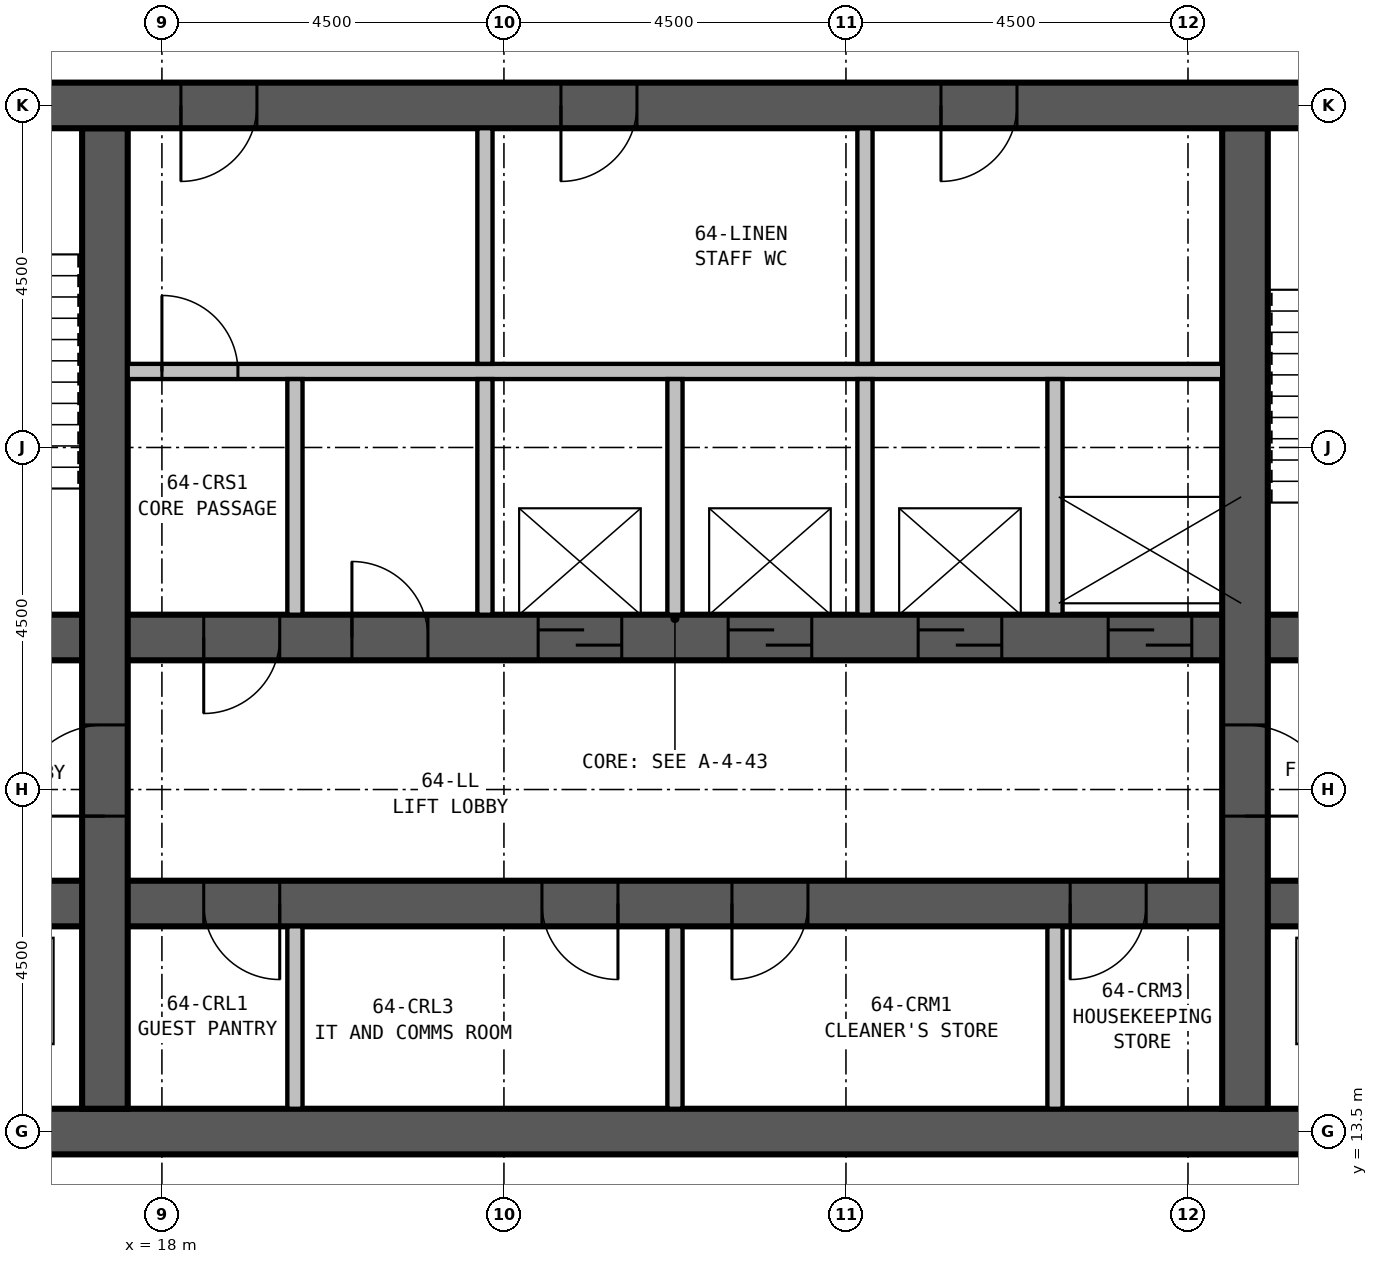
"""IFC4 building model, lengths in metres.
Left out: names, types, materials, properties, quantities, classifications, styles, units other than length and angle.
Written with IfcOpenShell. Run it as: python <this file> out.ifc"""

import sys

from ifc_helpers import new_model, si_unit, direction, frame, frame_2d, origin, place, context, subcontext, project, spatial, rectangle, extrude, element, fill, save


model = new_model("IFC4")
c1 = context("Model", 3, precision=1e-05, world=origin(), true_north=direction((0.0, 1.0)))
c2 = subcontext(c1, "Body", "Model", "MODEL_VIEW")
j1 = project(units=[si_unit("LENGTHUNIT", "METRE"), si_unit("PLANEANGLEUNIT", "RADIAN")], contexts=[c1])
p1 = place(None, origin())
s1 = spatial("IfcSite", under=j1, at=p1, CompositionType="ELEMENT")
p2 = place(p1, origin())
s2 = spatial("IfcBuilding", under=s1, at=p2, CompositionType="ELEMENT")
p3 = place(p2, frame((0.0, 0.0, 250.7)))
s3 = spatial("IfcBuildingStorey", under=s2, at=p3, CompositionType="ELEMENT", Elevation=250.7)
p4 = place(p3, frame((13.2, 13.5, 0.0), z_axis=(0.0, 0.0, 1.0), x_axis=(1.0, 0.0, 0.0)))
e1 = element("IfcWall", 1, at=p4, inside=s3, PredefinedType="SHEAR", context=c2, shape_type="SweptSolid", body=[
    extrude(rectangle(XDim=23.1, YDim=0.6, at=frame_2d((11.55, 0.0))), origin(), (0.0, 0.0, 1.0), 3.9),
])
p5 = place(p3, frame((36.3, 27.0, 0.0), z_axis=(0.0, 0.0, 1.0), x_axis=(-1.0, 0.0, 0.0)))
e2 = element("IfcWall", 2, at=p5, inside=s3, PredefinedType="SHEAR", context=c2, shape_type="SweptSolid", body=[
    extrude(rectangle(XDim=23.6, YDim=0.6, at=frame_2d((11.8, 0.0))), origin(), (0.0, 0.0, 1.0), 3.9),
])
p6 = place(p5, frame((17.05, 0.0, 0.0)))
e3 = element("IfcOpeningElement", 3, at=p6, cuts=e2, PredefinedType="OPENING", context=c2, shape_type="SweptSolid", body=[
    extrude(rectangle(XDim=1.0, YDim=2.1, at=frame_2d((0.5, 1.05))), frame((0.0, 0.31, 0.0), z_axis=(0.0, -1.0, 0.0), x_axis=(1.0, 0.0, 0.0)), (0.0, 0.0, 1.0), 0.62),
])
p7 = place(p5, frame((12.05, 0.0, 0.0)))
e4 = element("IfcOpeningElement", 4, at=p7, cuts=e2, PredefinedType="OPENING", context=c2, shape_type="SweptSolid", body=[
    extrude(rectangle(XDim=1.0, YDim=2.1, at=frame_2d((0.5, 1.05))), frame((0.0, 0.31, 0.0), z_axis=(0.0, -1.0, 0.0), x_axis=(1.0, 0.0, 0.0)), (0.0, 0.0, 1.0), 0.62),
])
p8 = place(p5, frame((7.05, 0.0, 0.0)))
e5 = element("IfcOpeningElement", 5, at=p8, cuts=e2, PredefinedType="OPENING", context=c2, shape_type="SweptSolid", body=[
    extrude(rectangle(XDim=1.0, YDim=2.1, at=frame_2d((0.5, 1.05))), frame((0.0, 0.31, 0.0), z_axis=(0.0, -1.0, 0.0), x_axis=(1.0, 0.0, 0.0)), (0.0, 0.0, 1.0), 0.62),
])
p9 = place(p3, frame((17.25, 13.8, 0.0), z_axis=(0.0, 0.0, 1.0), x_axis=(0.0, 1.0, 0.0)))
e6 = element("IfcWall", 6, at=p9, inside=s3, PredefinedType="SHEAR", context=c2, shape_type="SweptSolid", body=[
    extrude(rectangle(XDim=12.9, YDim=0.6, at=frame_2d((6.45, 0.0))), origin(), (0.0, 0.0, 1.0), 3.9),
])
p10 = place(p9, frame((3.85, 0.0, 0.0)))
e7 = element("IfcOpeningElement", 7, at=p10, cuts=e6, PredefinedType="OPENING", context=c2, shape_type="SweptSolid", body=[
    extrude(rectangle(XDim=1.2, YDim=2.1, at=frame_2d((0.6, 1.05))), frame((0.0, 0.31, 0.0), z_axis=(0.0, -1.0, 0.0), x_axis=(1.0, 0.0, 0.0)), (0.0, 0.0, 1.0), 0.62),
])
p11 = place(p3, frame((32.25, 13.8, 0.0), z_axis=(0.0, 0.0, 1.0), x_axis=(0.0, 1.0, 0.0)))
e8 = element("IfcWall", 8, at=p11, inside=s3, PredefinedType="SHEAR", context=c2, shape_type="SweptSolid", body=[
    extrude(rectangle(XDim=12.9, YDim=0.6, at=frame_2d((6.45, 0.0))), origin(), (0.0, 0.0, 1.0), 3.9),
])
p12 = place(p11, frame((5.05, 0.0, 0.0), z_axis=(0.0, 0.0, 1.0), x_axis=(-1.0, 0.0, 0.0)))
e9 = element("IfcOpeningElement", 9, at=p12, cuts=e8, PredefinedType="OPENING", context=c2, shape_type="SweptSolid", body=[
    extrude(rectangle(XDim=1.2, YDim=2.1, at=frame_2d((0.6, 1.05))), frame((0.0, 0.31, 0.0), z_axis=(0.0, -1.0, 0.0), x_axis=(1.0, 0.0, 0.0)), (0.0, 0.0, 1.0), 0.62),
])
p13 = place(p3, frame((13.8, 16.5, 0.0), z_axis=(0.0, 0.0, 1.0), x_axis=(1.0, 0.0, 0.0)))
e10 = element("IfcWall", 10, at=p13, inside=s3, PredefinedType="SHEAR", context=c2, shape_type="SweptSolid", body=[
    extrude(rectangle(XDim=21.9, YDim=0.6, at=frame_2d((10.95, 0.0))), origin(), (0.0, 0.0, 1.0), 3.9),
])
p14 = place(p13, frame((5.75, 0.0, 0.0), z_axis=(0.0, 0.0, 1.0), x_axis=(-1.0, 0.0, 0.0)))
e11 = element("IfcOpeningElement", 11, at=p14, cuts=e10, PredefinedType="OPENING", context=c2, shape_type="SweptSolid", body=[
    extrude(rectangle(XDim=1.0, YDim=2.1, at=frame_2d((0.5, 1.05))), frame((0.0, 0.31, 0.0), z_axis=(0.0, -1.0, 0.0), x_axis=(1.0, 0.0, 0.0)), (0.0, 0.0, 1.0), 0.62),
])
p15 = place(p13, frame((10.2, 0.0, 0.0), z_axis=(0.0, 0.0, 1.0), x_axis=(-1.0, 0.0, 0.0)))
e12 = element("IfcOpeningElement", 12, at=p15, cuts=e10, PredefinedType="OPENING", context=c2, shape_type="SweptSolid", body=[
    extrude(rectangle(XDim=1.0, YDim=2.1, at=frame_2d((0.5, 1.05))), frame((0.0, 0.31, 0.0), z_axis=(0.0, -1.0, 0.0), x_axis=(1.0, 0.0, 0.0)), (0.0, 0.0, 1.0), 0.62),
])
p16 = place(p13, frame((12.7, 0.0, 0.0), z_axis=(0.0, 0.0, 1.0), x_axis=(-1.0, 0.0, 0.0)))
e13 = element("IfcOpeningElement", 13, at=p16, cuts=e10, PredefinedType="OPENING", context=c2, shape_type="SweptSolid", body=[
    extrude(rectangle(XDim=1.0, YDim=2.1, at=frame_2d((0.5, 1.05))), frame((0.0, 0.31, 0.0), z_axis=(0.0, -1.0, 0.0), x_axis=(1.0, 0.0, 0.0)), (0.0, 0.0, 1.0), 0.62),
])
p17 = place(p13, frame((17.15, 0.0, 0.0), z_axis=(0.0, 0.0, 1.0), x_axis=(-1.0, 0.0, 0.0)))
e14 = element("IfcOpeningElement", 14, at=p17, cuts=e10, PredefinedType="OPENING", context=c2, shape_type="SweptSolid", body=[
    extrude(rectangle(XDim=1.0, YDim=2.1, at=frame_2d((0.5, 1.05))), frame((0.0, 0.31, 0.0), z_axis=(0.0, -1.0, 0.0), x_axis=(1.0, 0.0, 0.0)), (0.0, 0.0, 1.0), 0.62),
])
p18 = place(p13, frame((0.6, 0.0, 0.0)))
e15 = element("IfcOpeningElement", 15, at=p18, cuts=e10, PredefinedType="OPENING", context=c2, shape_type="SweptSolid", body=[
    extrude(rectangle(XDim=1.2, YDim=2.1, at=frame_2d((0.6, 1.05))), frame((0.0, 0.31, 0.0), z_axis=(0.0, -1.0, 0.0), x_axis=(1.0, 0.0, 0.0)), (0.0, 0.0, 1.0), 0.62),
])
p19 = place(p13, frame((19.6, 0.0, 0.0)))
e16 = element("IfcOpeningElement", 16, at=p19, cuts=e10, PredefinedType="OPENING", context=c2, shape_type="SweptSolid", body=[
    extrude(rectangle(XDim=1.2, YDim=2.1, at=frame_2d((0.6, 1.05))), frame((0.0, 0.31, 0.0), z_axis=(0.0, -1.0, 0.0), x_axis=(1.0, 0.0, 0.0)), (0.0, 0.0, 1.0), 0.62),
])
p20 = place(p3, frame((13.8, 20.0, 0.0), z_axis=(0.0, 0.0, 1.0), x_axis=(1.0, 0.0, 0.0)))
e17 = element("IfcWall", 17, at=p20, inside=s3, PredefinedType="SHEAR", context=c2, shape_type="SweptSolid", body=[
    extrude(rectangle(XDim=21.9, YDim=0.6, at=frame_2d((10.95, 0.0))), origin(), (0.0, 0.0, 1.0), 3.9),
])
p21 = place(p20, frame((0.5, 0.0, 0.0)))
e18 = element("IfcOpeningElement", 18, at=p21, cuts=e17, PredefinedType="OPENING", context=c2, shape_type="SweptSolid", body=[
    extrude(rectangle(XDim=1.0, YDim=2.1, at=frame_2d((0.5, 1.05))), frame((0.0, 0.31, 0.0), z_axis=(0.0, -1.0, 0.0), x_axis=(1.0, 0.0, 0.0)), (0.0, 0.0, 1.0), 0.62),
])
p22 = place(p20, frame((20.5, 0.0, 0.0)))
e19 = element("IfcOpeningElement", 19, at=p22, cuts=e17, PredefinedType="OPENING", context=c2, shape_type="SweptSolid", body=[
    extrude(rectangle(XDim=1.0, YDim=2.1, at=frame_2d((0.5, 1.05))), frame((0.0, 0.31, 0.0), z_axis=(0.0, -1.0, 0.0), x_axis=(1.0, 0.0, 0.0)), (0.0, 0.0, 1.0), 0.62),
])
p23 = place(p20, frame((9.15, 0.0, 0.0)))
e20 = element("IfcOpeningElement", 20, at=p23, cuts=e17, PredefinedType="OPENING", context=c2, shape_type="SweptSolid", body=[
    extrude(rectangle(XDim=1.1, YDim=2.1, at=frame_2d((0.55, 1.05))), frame((0.0, 0.31, 0.0), z_axis=(0.0, -1.0, 0.0), x_axis=(1.0, 0.0, 0.0)), (0.0, 0.0, 1.0), 0.62),
])
p24 = place(p20, frame((11.65, 0.0, 0.0)))
e21 = element("IfcOpeningElement", 21, at=p24, cuts=e17, PredefinedType="OPENING", context=c2, shape_type="SweptSolid", body=[
    extrude(rectangle(XDim=1.1, YDim=2.1, at=frame_2d((0.55, 1.05))), frame((0.0, 0.31, 0.0), z_axis=(0.0, -1.0, 0.0), x_axis=(1.0, 0.0, 0.0)), (0.0, 0.0, 1.0), 0.62),
])
p25 = place(p20, frame((14.15, 0.0, 0.0)))
e22 = element("IfcOpeningElement", 22, at=p25, cuts=e17, PredefinedType="OPENING", context=c2, shape_type="SweptSolid", body=[
    extrude(rectangle(XDim=1.1, YDim=2.1, at=frame_2d((0.55, 1.05))), frame((0.0, 0.31, 0.0), z_axis=(0.0, -1.0, 0.0), x_axis=(1.0, 0.0, 0.0)), (0.0, 0.0, 1.0), 0.62),
])
p26 = place(p20, frame((16.65, 0.0, 0.0)))
e23 = element("IfcOpeningElement", 23, at=p26, cuts=e17, PredefinedType="OPENING", context=c2, shape_type="SweptSolid", body=[
    extrude(rectangle(XDim=1.1, YDim=2.1, at=frame_2d((0.55, 1.05))), frame((0.0, 0.31, 0.0), z_axis=(0.0, -1.0, 0.0), x_axis=(1.0, 0.0, 0.0)), (0.0, 0.0, 1.0), 0.62),
])
p27 = place(p20, frame((5.75, 0.0, 0.0), z_axis=(0.0, 0.0, 1.0), x_axis=(-1.0, 0.0, 0.0)))
e24 = element("IfcOpeningElement", 24, at=p27, cuts=e17, PredefinedType="OPENING", context=c2, shape_type="SweptSolid", body=[
    extrude(rectangle(XDim=1.0, YDim=2.1, at=frame_2d((0.5, 1.05))), frame((0.0, 0.31, 0.0), z_axis=(0.0, -1.0, 0.0), x_axis=(1.0, 0.0, 0.0)), (0.0, 0.0, 1.0), 0.62),
])
p28 = place(p20, frame((6.7, 0.0, 0.0)))
e25 = element("IfcOpeningElement", 25, at=p28, cuts=e17, PredefinedType="OPENING", context=c2, shape_type="SweptSolid", body=[
    extrude(rectangle(XDim=1.0, YDim=2.1, at=frame_2d((0.5, 1.05))), frame((0.0, 0.31, 0.0), z_axis=(0.0, -1.0, 0.0), x_axis=(1.0, 0.0, 0.0)), (0.0, 0.0, 1.0), 0.62),
])
p29 = place(p3, frame((19.75, 13.8, 0.0), z_axis=(0.0, 0.0, 1.0), x_axis=(0.0, 1.0, 0.0)))
e26 = element("IfcWall", 26, at=p29, inside=s3, PredefinedType="PARTITIONING", context=c2, shape_type="SweptSolid", body=[
    extrude(rectangle(XDim=2.4, YDim=0.2, at=frame_2d((1.2, 0.0))), origin(), (0.0, 0.0, 1.0), 3.65),
])
for number, where, z_axis, x_axis in (
    (27, (19.75, 20.3, 0.0), (0.0, 0.0, 1.0), (0.0, 1.0, 0.0)),
    (28, (22.25, 20.3, 0.0), (0.0, 0.0, 1.0), (0.0, 1.0, 0.0)),
):
    element("IfcWall", number, at=place(p3, frame(where, z_axis=z_axis, x_axis=x_axis)), inside=s3, PredefinedType="PARTITIONING", context=c2, shape_type="SweptSolid", body=[
        extrude(rectangle(XDim=3.1, YDim=0.2, at=frame_2d((1.55, 0.0))), origin(), (0.0, 0.0, 1.0), 3.65),
    ])
p30 = place(p3, frame((24.75, 13.8, 0.0), z_axis=(0.0, 0.0, 1.0), x_axis=(0.0, 1.0, 0.0)))
e29 = element("IfcWall", 29, at=p30, inside=s3, PredefinedType="PARTITIONING", context=c2, shape_type="SweptSolid", body=[
    extrude(rectangle(XDim=2.4, YDim=0.2, at=frame_2d((1.2, 0.0))), origin(), (0.0, 0.0, 1.0), 3.65),
])
for number, where, z_axis, x_axis in (
    (30, (24.75, 20.3, 0.0), (0.0, 0.0, 1.0), (0.0, 1.0, 0.0)),
    (31, (27.25, 20.3, 0.0), (0.0, 0.0, 1.0), (0.0, 1.0, 0.0)),
):
    element("IfcWall", number, at=place(p3, frame(where, z_axis=z_axis, x_axis=x_axis)), inside=s3, PredefinedType="PARTITIONING", context=c2, shape_type="SweptSolid", body=[
        extrude(rectangle(XDim=3.1, YDim=0.2, at=frame_2d((1.55, 0.0))), origin(), (0.0, 0.0, 1.0), 3.65),
    ])
p31 = place(p3, frame((29.75, 13.8, 0.0), z_axis=(0.0, 0.0, 1.0), x_axis=(0.0, 1.0, 0.0)))
e32 = element("IfcWall", 32, at=p31, inside=s3, PredefinedType="PARTITIONING", context=c2, shape_type="SweptSolid", body=[
    extrude(rectangle(XDim=2.4, YDim=0.2, at=frame_2d((1.2, 0.0))), origin(), (0.0, 0.0, 1.0), 3.65),
])
p32 = place(p3, frame((29.75, 20.3, 0.0), z_axis=(0.0, 0.0, 1.0), x_axis=(0.0, 1.0, 0.0)))
e33 = element("IfcWall", 33, at=p32, inside=s3, PredefinedType="PARTITIONING", context=c2, shape_type="SweptSolid", body=[
    extrude(rectangle(XDim=3.1, YDim=0.2, at=frame_2d((1.55, 0.0))), origin(), (0.0, 0.0, 1.0), 3.65),
])
p33 = place(p3, frame((17.55, 23.5, 0.0), z_axis=(0.0, 0.0, 1.0), x_axis=(1.0, 0.0, 0.0)))
e34 = element("IfcWall", 34, at=p33, inside=s3, PredefinedType="PARTITIONING", context=c2, shape_type="SweptSolid", body=[
    extrude(rectangle(XDim=14.4, YDim=0.2, at=frame_2d((7.2, 0.0))), origin(), (0.0, 0.0, 1.0), 3.65),
])
p34 = place(p33, frame((0.45, 0.0, 0.0)))
e35 = element("IfcOpeningElement", 35, at=p34, cuts=e34, PredefinedType="OPENING", context=c2, shape_type="SweptSolid", body=[
    extrude(rectangle(XDim=1.0, YDim=2.1, at=frame_2d((0.5, 1.05))), frame((0.0, 0.11, 0.0), z_axis=(0.0, -1.0, 0.0), x_axis=(1.0, 0.0, 0.0)), (0.0, 0.0, 1.0), 0.22),
])
for number, where, z_axis, x_axis in (
    (36, (22.25, 23.6, 0.0), (0.0, 0.0, 1.0), (0.0, 1.0, 0.0)),
    (37, (27.25, 23.6, 0.0), (0.0, 0.0, 1.0), (0.0, 1.0, 0.0)),
):
    element("IfcWall", number, at=place(p3, frame(where, z_axis=z_axis, x_axis=x_axis)), inside=s3, PredefinedType="PARTITIONING", context=c2, shape_type="SweptSolid", body=[
        extrude(rectangle(XDim=3.1, YDim=0.2, at=frame_2d((1.55, 0.0))), origin(), (0.0, 0.0, 1.0), 3.65),
    ])
p35 = place(p34, origin())
e38 = element("IfcDoor", 38, at=p35, inside=s3, OperationType="SINGLE_SWING_LEFT", PredefinedType="DOOR", context=c2, shape_type="SweptSolid", body=[
    extrude(rectangle(XDim=1.0, YDim=2.1, at=frame_2d((0.5, 1.05))), frame((0.0, 0.025, 0.0), z_axis=(0.0, -1.0, 0.0), x_axis=(1.0, 0.0, 0.0)), (0.0, 0.0, 1.0), 0.05),
])
fill(e35, e38)
p36 = place(p10, origin())
e39 = element("IfcDoor", 39, at=p36, inside=s3, OperationType="SINGLE_SWING_LEFT", PredefinedType="DOOR", context=c2, shape_type="SweptSolid", body=[
    extrude(rectangle(XDim=1.2, YDim=2.1, at=frame_2d((0.6, 1.05))), frame((0.0, 0.3, 0.0), z_axis=(0.0, -1.0, 0.0), x_axis=(1.0, 0.0, 0.0)), (0.0, 0.0, 1.0), 0.6),
])
fill(e7, e39)
p37 = place(p12, origin())
e40 = element("IfcDoor", 40, at=p37, inside=s3, OperationType="SINGLE_SWING_RIGHT", PredefinedType="DOOR", context=c2, shape_type="SweptSolid", body=[
    extrude(rectangle(XDim=1.2, YDim=2.1, at=frame_2d((0.6, 1.05))), frame((0.0, 0.3, 0.0), z_axis=(0.0, -1.0, 0.0), x_axis=(1.0, 0.0, 0.0)), (0.0, 0.0, 1.0), 0.6),
])
fill(e9, e40)
p38 = place(p23, origin())
e41 = element("IfcDoor", 41, at=p38, inside=s3, OperationType="SLIDING_TO_LEFT", PredefinedType="DOOR", context=c2, shape_type="SweptSolid", body=[
    extrude(rectangle(XDim=1.1, YDim=2.1, at=frame_2d((0.55, 1.05))), frame((0.0, 0.3, 0.0), z_axis=(0.0, -1.0, 0.0), x_axis=(1.0, 0.0, 0.0)), (0.0, 0.0, 1.0), 0.6),
])
fill(e20, e41)
p39 = place(p24, origin())
e42 = element("IfcDoor", 42, at=p39, inside=s3, OperationType="SLIDING_TO_LEFT", PredefinedType="DOOR", context=c2, shape_type="SweptSolid", body=[
    extrude(rectangle(XDim=1.1, YDim=2.1, at=frame_2d((0.55, 1.05))), frame((0.0, 0.3, 0.0), z_axis=(0.0, -1.0, 0.0), x_axis=(1.0, 0.0, 0.0)), (0.0, 0.0, 1.0), 0.6),
])
fill(e21, e42)
p40 = place(p25, origin())
e43 = element("IfcDoor", 43, at=p40, inside=s3, OperationType="SLIDING_TO_LEFT", PredefinedType="DOOR", context=c2, shape_type="SweptSolid", body=[
    extrude(rectangle(XDim=1.1, YDim=2.1, at=frame_2d((0.55, 1.05))), frame((0.0, 0.3, 0.0), z_axis=(0.0, -1.0, 0.0), x_axis=(1.0, 0.0, 0.0)), (0.0, 0.0, 1.0), 0.6),
])
fill(e22, e43)
p41 = place(p26, origin())
e44 = element("IfcDoor", 44, at=p41, inside=s3, OperationType="SLIDING_TO_LEFT", PredefinedType="DOOR", context=c2, shape_type="SweptSolid", body=[
    extrude(rectangle(XDim=1.1, YDim=2.1, at=frame_2d((0.55, 1.05))), frame((0.0, 0.3, 0.0), z_axis=(0.0, -1.0, 0.0), x_axis=(1.0, 0.0, 0.0)), (0.0, 0.0, 1.0), 0.6),
])
fill(e23, e44)
p42 = place(p14, origin())
e45 = element("IfcDoor", 45, at=p42, inside=s3, OperationType="SINGLE_SWING_LEFT", PredefinedType="DOOR", context=c2, shape_type="SweptSolid", body=[
    extrude(rectangle(XDim=1.0, YDim=2.1, at=frame_2d((0.5, 1.05))), frame((0.0, 0.3, 0.0), z_axis=(0.0, -1.0, 0.0), x_axis=(1.0, 0.0, 0.0)), (0.0, 0.0, 1.0), 0.6),
])
fill(e11, e45)
p43 = place(p15, origin())
e46 = element("IfcDoor", 46, at=p43, inside=s3, OperationType="SINGLE_SWING_LEFT", PredefinedType="DOOR", context=c2, shape_type="SweptSolid", body=[
    extrude(rectangle(XDim=1.0, YDim=2.1, at=frame_2d((0.5, 1.05))), frame((0.0, 0.3, 0.0), z_axis=(0.0, -1.0, 0.0), x_axis=(1.0, 0.0, 0.0)), (0.0, 0.0, 1.0), 0.6),
])
fill(e12, e46)
p44 = place(p16, origin())
e47 = element("IfcDoor", 47, at=p44, inside=s3, OperationType="SINGLE_SWING_RIGHT", PredefinedType="DOOR", context=c2, shape_type="SweptSolid", body=[
    extrude(rectangle(XDim=1.0, YDim=2.1, at=frame_2d((0.5, 1.05))), frame((0.0, 0.3, 0.0), z_axis=(0.0, -1.0, 0.0), x_axis=(1.0, 0.0, 0.0)), (0.0, 0.0, 1.0), 0.6),
])
fill(e13, e47)
p45 = place(p17, origin())
e48 = element("IfcDoor", 48, at=p45, inside=s3, OperationType="SINGLE_SWING_RIGHT", PredefinedType="DOOR", context=c2, shape_type="SweptSolid", body=[
    extrude(rectangle(XDim=1.0, YDim=2.1, at=frame_2d((0.5, 1.05))), frame((0.0, 0.3, 0.0), z_axis=(0.0, -1.0, 0.0), x_axis=(1.0, 0.0, 0.0)), (0.0, 0.0, 1.0), 0.6),
])
fill(e14, e48)
p46 = place(p27, origin())
e49 = element("IfcDoor", 49, at=p46, inside=s3, OperationType="SINGLE_SWING_RIGHT", PredefinedType="DOOR", context=c2, shape_type="SweptSolid", body=[
    extrude(rectangle(XDim=1.0, YDim=2.1, at=frame_2d((0.5, 1.05))), frame((0.0, 0.3, 0.0), z_axis=(0.0, -1.0, 0.0), x_axis=(1.0, 0.0, 0.0)), (0.0, 0.0, 1.0), 0.6),
])
fill(e24, e49)
p47 = place(p28, origin())
e50 = element("IfcDoor", 50, at=p47, inside=s3, OperationType="SINGLE_SWING_LEFT", PredefinedType="DOOR", context=c2, shape_type="SweptSolid", body=[
    extrude(rectangle(XDim=1.0, YDim=2.1, at=frame_2d((0.5, 1.05))), frame((0.0, 0.3, 0.0), z_axis=(0.0, -1.0, 0.0), x_axis=(1.0, 0.0, 0.0)), (0.0, 0.0, 1.0), 0.6),
])
fill(e25, e50)
p48 = place(p6, origin())
e51 = element("IfcDoor", 51, at=p48, inside=s3, OperationType="SINGLE_SWING_RIGHT", PredefinedType="DOOR", context=c2, shape_type="SweptSolid", body=[
    extrude(rectangle(XDim=1.0, YDim=2.1, at=frame_2d((0.5, 1.05))), frame((0.0, 0.3, 0.0), z_axis=(0.0, -1.0, 0.0), x_axis=(1.0, 0.0, 0.0)), (0.0, 0.0, 1.0), 0.6),
])
fill(e3, e51)
p49 = place(p7, origin())
e52 = element("IfcDoor", 52, at=p49, inside=s3, OperationType="SINGLE_SWING_RIGHT", PredefinedType="DOOR", context=c2, shape_type="SweptSolid", body=[
    extrude(rectangle(XDim=1.0, YDim=2.1, at=frame_2d((0.5, 1.05))), frame((0.0, 0.3, 0.0), z_axis=(0.0, -1.0, 0.0), x_axis=(1.0, 0.0, 0.0)), (0.0, 0.0, 1.0), 0.6),
])
fill(e4, e52)
p50 = place(p8, origin())
e53 = element("IfcDoor", 53, at=p50, inside=s3, OperationType="SINGLE_SWING_RIGHT", PredefinedType="DOOR", context=c2, shape_type="SweptSolid", body=[
    extrude(rectangle(XDim=1.0, YDim=2.1, at=frame_2d((0.5, 1.05))), frame((0.0, 0.3, 0.0), z_axis=(0.0, -1.0, 0.0), x_axis=(1.0, 0.0, 0.0)), (0.0, 0.0, 1.0), 0.6),
])
fill(e5, e53)
save(model, sys.argv[1])
